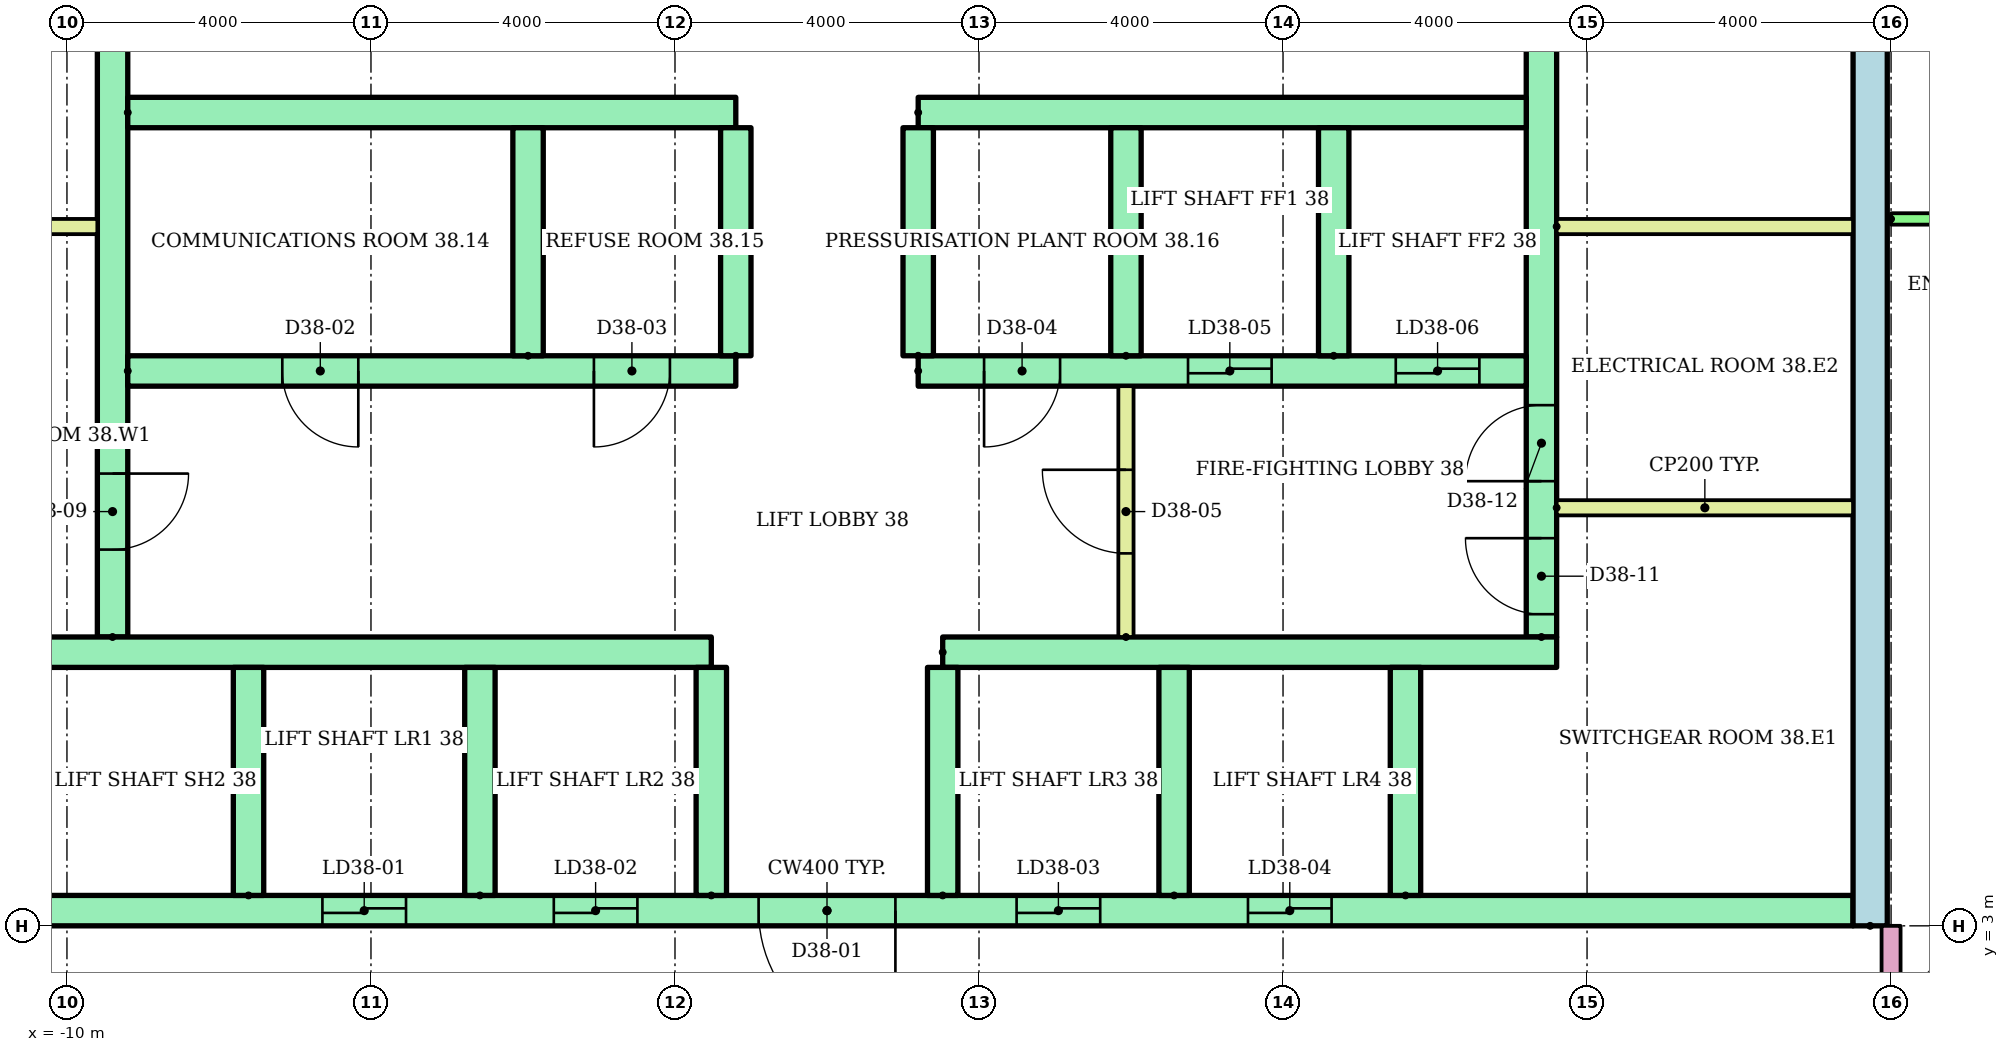
"""IFC4 building model, lengths in metres.
Left out: names, types, materials, properties, quantities, classifications, styles, units other than length and angle.
Written with IfcOpenShell. Run it as: python <this file> out.ifc"""

import sys

from ifc_helpers import new_model, si_unit, direction, frame, frame_2d, origin, place, context, subcontext, project, spatial, rectangle, extrude, element, fill, save


model = new_model("IFC4")
c1 = context("Model", 3, precision=1e-05, world=origin(), true_north=direction((0.0, 1.0)))
c2 = subcontext(c1, "Body", "Model", "MODEL_VIEW")
j1 = project(units=[si_unit("LENGTHUNIT", "METRE"), si_unit("PLANEANGLEUNIT", "RADIAN")], contexts=[c1])
p1 = place(None, origin())
s1 = spatial("IfcSite", under=j1, at=p1, CompositionType="ELEMENT")
p2 = place(p1, origin())
s2 = spatial("IfcBuilding", under=s1, at=p2, CompositionType="ELEMENT")
p3 = place(p2, frame((0.0, 0.0, 145.4)))
s3 = spatial("IfcBuildingStorey", under=s2, at=p3, CompositionType="ELEMENT", Elevation=145.4)
p4 = place(p3, frame((13.725, 3.0, 0.0), z_axis=(0.0, 0.0, 1.0), x_axis=(0.0, 1.0, 0.0)))
e1 = element("IfcWall", 1, at=p4, inside=s3, PredefinedType="SHEAR", context=c2, shape_type="SweptSolid", body=[
    extrude(rectangle(XDim=17.0, YDim=0.45, at=frame_2d((8.5, 0.0))), origin(), (0.0, 0.0, 1.0), 2.92),
])
p5 = place(p3, frame((-9.4, 6.8, 0.0), z_axis=(0.0, 0.0, 1.0), x_axis=(0.0, 1.0, 0.0)))
e2 = element("IfcWall", 2, at=p5, inside=s3, PredefinedType="SHEAR", context=c2, shape_type="SweptSolid", body=[
    extrude(rectangle(XDim=12.7, YDim=0.4, at=frame_2d((6.35, 0.0))), origin(), (0.0, 0.0, 1.0), 2.92),
])
p6 = place(p5, frame((1.15, 0.0, 0.0)))
e3 = element("IfcOpeningElement", 3, at=p6, cuts=e2, PredefinedType="OPENING", context=c2, shape_type="SweptSolid", body=[
    extrude(rectangle(XDim=1.0, YDim=2.1, at=frame_2d((0.5, 1.05))), frame((0.0, 0.21, 0.0), z_axis=(0.0, -1.0, 0.0), x_axis=(1.0, 0.0, 0.0)), (0.0, 0.0, 1.0), 0.42),
])
p7 = place(p5, frame((7.925, 0.0, 0.0)))
e4 = element("IfcOpeningElement", 4, at=p7, cuts=e2, PredefinedType="OPENING", context=c2, shape_type="SweptSolid", body=[
    extrude(rectangle(XDim=1.0, YDim=2.1, at=frame_2d((0.5, 1.05))), frame((0.0, 0.21, 0.0), z_axis=(0.0, -1.0, 0.0), x_axis=(1.0, 0.0, 0.0)), (0.0, 0.0, 1.0), 0.42),
])
p8 = place(p3, frame((9.4, 6.8, 0.0), z_axis=(0.0, 0.0, 1.0), x_axis=(0.0, 1.0, 0.0)))
e5 = element("IfcWall", 5, at=p8, inside=s3, PredefinedType="SHEAR", context=c2, shape_type="SweptSolid", body=[
    extrude(rectangle(XDim=12.7, YDim=0.4, at=frame_2d((6.35, 0.0))), origin(), (0.0, 0.0, 1.0), 2.92),
])
p9 = place(p8, frame((0.3, 0.0, 0.0)))
e6 = element("IfcOpeningElement", 6, at=p9, cuts=e5, PredefinedType="OPENING", context=c2, shape_type="SweptSolid", body=[
    extrude(rectangle(XDim=1.0, YDim=2.1, at=frame_2d((0.5, 1.05))), frame((0.0, 0.21, 0.0), z_axis=(0.0, -1.0, 0.0), x_axis=(1.0, 0.0, 0.0)), (0.0, 0.0, 1.0), 0.42),
])
p10 = place(p8, frame((2.05, 0.0, 0.0)))
e7 = element("IfcOpeningElement", 7, at=p10, cuts=e5, PredefinedType="OPENING", context=c2, shape_type="SweptSolid", body=[
    extrude(rectangle(XDim=1.0, YDim=2.1, at=frame_2d((0.5, 1.05))), frame((0.0, 0.21, 0.0), z_axis=(0.0, -1.0, 0.0), x_axis=(1.0, 0.0, 0.0)), (0.0, 0.0, 1.0), 0.42),
])
p11 = place(p8, frame((7.925, 0.0, 0.0)))
e8 = element("IfcOpeningElement", 8, at=p11, cuts=e5, PredefinedType="OPENING", context=c2, shape_type="SweptSolid", body=[
    extrude(rectangle(XDim=1.0, YDim=2.1, at=frame_2d((0.5, 1.05))), frame((0.0, 0.21, 0.0), z_axis=(0.0, -1.0, 0.0), x_axis=(1.0, 0.0, 0.0)), (0.0, 0.0, 1.0), 0.42),
])
p12 = place(p3, frame((-13.5, 3.2, 0.0)))
e9 = element("IfcWall", 9, at=p12, inside=s3, PredefinedType="SHEAR", context=c2, shape_type="SweptSolid", body=[
    extrude(rectangle(XDim=27.0, YDim=0.4, at=frame_2d((13.5, 0.0))), origin(), (0.0, 0.0, 1.0), 2.92),
])
p13 = place(p12, frame((6.861, 0.0, 0.0)))
e10 = element("IfcOpeningElement", 10, at=p13, cuts=e9, PredefinedType="OPENING", context=c2, shape_type="SweptSolid", body=[
    extrude(rectangle(XDim=1.1, YDim=2.1, at=frame_2d((0.55, 1.05))), frame((0.0, 0.21, 0.0), z_axis=(0.0, -1.0, 0.0), x_axis=(1.0, 0.0, 0.0)), (0.0, 0.0, 1.0), 0.42),
])
p14 = place(p12, frame((9.906, 0.0, 0.0)))
e11 = element("IfcOpeningElement", 11, at=p14, cuts=e9, PredefinedType="OPENING", context=c2, shape_type="SweptSolid", body=[
    extrude(rectangle(XDim=1.1, YDim=2.1, at=frame_2d((0.55, 1.05))), frame((0.0, 0.21, 0.0), z_axis=(0.0, -1.0, 0.0), x_axis=(1.0, 0.0, 0.0)), (0.0, 0.0, 1.0), 0.42),
])
p15 = place(p12, frame((15.994, 0.0, 0.0)))
e12 = element("IfcOpeningElement", 12, at=p15, cuts=e9, PredefinedType="OPENING", context=c2, shape_type="SweptSolid", body=[
    extrude(rectangle(XDim=1.1, YDim=2.1, at=frame_2d((0.55, 1.05))), frame((0.0, 0.21, 0.0), z_axis=(0.0, -1.0, 0.0), x_axis=(1.0, 0.0, 0.0)), (0.0, 0.0, 1.0), 0.42),
])
p16 = place(p12, frame((19.039, 0.0, 0.0)))
e13 = element("IfcOpeningElement", 13, at=p16, cuts=e9, PredefinedType="OPENING", context=c2, shape_type="SweptSolid", body=[
    extrude(rectangle(XDim=1.1, YDim=2.1, at=frame_2d((0.55, 1.05))), frame((0.0, 0.21, 0.0), z_axis=(0.0, -1.0, 0.0), x_axis=(1.0, 0.0, 0.0)), (0.0, 0.0, 1.0), 0.42),
])
p17 = place(p12, frame((12.6, 0.0, 0.0)))
e14 = element("IfcOpeningElement", 14, at=p17, cuts=e9, PredefinedType="OPENING", context=c2, shape_type="SweptSolid", body=[
    extrude(rectangle(XDim=1.8, YDim=2.1, at=frame_2d((0.9, 1.05))), frame((0.0, 0.21, 0.0), z_axis=(0.0, -1.0, 0.0), x_axis=(1.0, 0.0, 0.0)), (0.0, 0.0, 1.0), 0.42),
])
p18 = place(p3, frame((-13.5, 6.6, 0.0)))
e15 = element("IfcWall", 15, at=p18, inside=s3, PredefinedType="SHEAR", context=c2, shape_type="SweptSolid", body=[
    extrude(rectangle(XDim=11.978, YDim=0.4, at=frame_2d((5.989, 0.0))), origin(), (0.0, 0.0, 1.0), 2.92),
])
p19 = place(p3, frame((1.522, 6.6, 0.0)))
e16 = element("IfcWall", 16, at=p19, inside=s3, PredefinedType="SHEAR", context=c2, shape_type="SweptSolid", body=[
    extrude(rectangle(XDim=8.078, YDim=0.4, at=frame_2d((4.039, 0.0))), origin(), (0.0, 0.0, 1.0), 2.92),
])
for number, where, z_axis, x_axis in (
    (17, (-7.611, 3.4, 0.0), (0.0, 0.0, 1.0), (0.0, 1.0, 0.0)),
    (18, (-4.567, 3.4, 0.0), (0.0, 0.0, 1.0), (0.0, 1.0, 0.0)),
    (19, (-1.522, 3.4, 0.0), (0.0, 0.0, 1.0), (0.0, 1.0, 0.0)),
    (20, (1.522, 3.4, 0.0), (0.0, 0.0, 1.0), (0.0, 1.0, 0.0)),
    (21, (4.567, 3.4, 0.0), (0.0, 0.0, 1.0), (0.0, 1.0, 0.0)),
    (22, (7.611, 3.4, 0.0), (0.0, 0.0, 1.0), (0.0, 1.0, 0.0)),
):
    element("IfcWall", number, at=place(p3, frame(where, z_axis=z_axis, x_axis=x_axis)), inside=s3, PredefinedType="SHEAR", context=c2, shape_type="SweptSolid", body=[
        extrude(rectangle(XDim=3.0, YDim=0.4, at=frame_2d((1.5, 0.0))), origin(), (0.0, 0.0, 1.0), 2.92),
    ])
p20 = place(p3, frame((-9.2, 10.3, 0.0)))
e23 = element("IfcWall", 23, at=p20, inside=s3, PredefinedType="SHEAR", context=c2, shape_type="SweptSolid", body=[
    extrude(rectangle(XDim=8.0, YDim=0.4, at=frame_2d((4.0, 0.0))), origin(), (0.0, 0.0, 1.0), 2.92),
])
p21 = place(p20, frame((2.033, 0.0, 0.0)))
e24 = element("IfcOpeningElement", 24, at=p21, cuts=e23, PredefinedType="OPENING", context=c2, shape_type="SweptSolid", body=[
    extrude(rectangle(XDim=1.0, YDim=2.1, at=frame_2d((0.5, 1.05))), frame((0.0, 0.21, 0.0), z_axis=(0.0, -1.0, 0.0), x_axis=(1.0, 0.0, 0.0)), (0.0, 0.0, 1.0), 0.42),
])
p22 = place(p20, frame((6.133, 0.0, 0.0)))
e25 = element("IfcOpeningElement", 25, at=p22, cuts=e23, PredefinedType="OPENING", context=c2, shape_type="SweptSolid", body=[
    extrude(rectangle(XDim=1.0, YDim=2.1, at=frame_2d((0.5, 1.05))), frame((0.0, 0.21, 0.0), z_axis=(0.0, -1.0, 0.0), x_axis=(1.0, 0.0, 0.0)), (0.0, 0.0, 1.0), 0.42),
])
p23 = place(p3, frame((-9.2, 13.7, 0.0)))
e26 = element("IfcWall", 26, at=p23, inside=s3, PredefinedType="SHEAR", context=c2, shape_type="SweptSolid", body=[
    extrude(rectangle(XDim=8.0, YDim=0.4, at=frame_2d((4.0, 0.0))), origin(), (0.0, 0.0, 1.0), 2.92),
])
p24 = place(p3, frame((1.2, 10.3, 0.0)))
e27 = element("IfcWall", 27, at=p24, inside=s3, PredefinedType="SHEAR", context=c2, shape_type="SweptSolid", body=[
    extrude(rectangle(XDim=8.0, YDim=0.4, at=frame_2d((4.0, 0.0))), origin(), (0.0, 0.0, 1.0), 2.92),
])
p25 = place(p24, frame((3.55, 0.0, 0.0)))
e28 = element("IfcOpeningElement", 28, at=p25, cuts=e27, PredefinedType="OPENING", context=c2, shape_type="SweptSolid", body=[
    extrude(rectangle(XDim=1.1, YDim=2.1, at=frame_2d((0.55, 1.05))), frame((0.0, 0.21, 0.0), z_axis=(0.0, -1.0, 0.0), x_axis=(1.0, 0.0, 0.0)), (0.0, 0.0, 1.0), 0.42),
])
p26 = place(p24, frame((6.283, 0.0, 0.0)))
e29 = element("IfcOpeningElement", 29, at=p26, cuts=e27, PredefinedType="OPENING", context=c2, shape_type="SweptSolid", body=[
    extrude(rectangle(XDim=1.1, YDim=2.1, at=frame_2d((0.55, 1.05))), frame((0.0, 0.21, 0.0), z_axis=(0.0, -1.0, 0.0), x_axis=(1.0, 0.0, 0.0)), (0.0, 0.0, 1.0), 0.42),
])
p27 = place(p24, frame((0.867, 0.0, 0.0)))
e30 = element("IfcOpeningElement", 30, at=p27, cuts=e27, PredefinedType="OPENING", context=c2, shape_type="SweptSolid", body=[
    extrude(rectangle(XDim=1.0, YDim=2.1, at=frame_2d((0.5, 1.05))), frame((0.0, 0.21, 0.0), z_axis=(0.0, -1.0, 0.0), x_axis=(1.0, 0.0, 0.0)), (0.0, 0.0, 1.0), 0.42),
])
p28 = place(p3, frame((1.2, 13.7, 0.0)))
e31 = element("IfcWall", 31, at=p28, inside=s3, PredefinedType="SHEAR", context=c2, shape_type="SweptSolid", body=[
    extrude(rectangle(XDim=8.0, YDim=0.4, at=frame_2d((4.0, 0.0))), origin(), (0.0, 0.0, 1.0), 2.92),
])
for number, where, z_axis, x_axis in (
    (32, (-3.933, 10.5, 0.0), (0.0, 0.0, 1.0), (0.0, 1.0, 0.0)),
    (33, (-1.2, 10.5, 0.0), (0.0, 0.0, 1.0), (0.0, 1.0, 0.0)),
    (34, (1.2, 10.5, 0.0), (0.0, 0.0, 1.0), (0.0, 1.0, 0.0)),
    (35, (3.933, 10.5, 0.0), (0.0, 0.0, 1.0), (0.0, 1.0, 0.0)),
    (36, (6.667, 10.5, 0.0), (0.0, 0.0, 1.0), (0.0, 1.0, 0.0)),
):
    element("IfcWall", number, at=place(p3, frame(where, z_axis=z_axis, x_axis=x_axis)), inside=s3, PredefinedType="SHEAR", context=c2, shape_type="SweptSolid", body=[
        extrude(rectangle(XDim=3.0, YDim=0.4, at=frame_2d((1.5, 0.0))), origin(), (0.0, 0.0, 1.0), 2.92),
    ])
p29 = place(p3, frame((3.933, 6.8, 0.0), z_axis=(0.0, 0.0, 1.0), x_axis=(0.0, 1.0, 0.0)))
e37 = element("IfcWall", 37, at=p29, inside=s3, PredefinedType="PARTITIONING", context=c2, shape_type="SweptSolid", body=[
    extrude(rectangle(XDim=3.3, YDim=0.2, at=frame_2d((1.65, 0.0))), origin(), (0.0, 0.0, 1.0), 2.92),
])
p30 = place(p29, frame((1.1, 0.0, 0.0)))
e38 = element("IfcOpeningElement", 38, at=p30, cuts=e37, PredefinedType="OPENING", context=c2, shape_type="SweptSolid", body=[
    extrude(rectangle(XDim=1.1, YDim=2.1, at=frame_2d((0.55, 1.05))), frame((0.0, 0.11, 0.0), z_axis=(0.0, -1.0, 0.0), x_axis=(1.0, 0.0, 0.0)), (0.0, 0.0, 1.0), 0.22),
])
for number, where in (
    (39, (-13.5, 12.2, 0.0)),
    (40, (9.6, 8.5, 0.0)),
    (41, (9.6, 12.2, 0.0)),
):
    element("IfcWall", number, at=place(p3, frame(where)), inside=s3, PredefinedType="PARTITIONING", context=c2, shape_type="SweptSolid", body=[
        extrude(rectangle(XDim=3.9, YDim=0.2, at=frame_2d((1.95, 0.0))), origin(), (0.0, 0.0, 1.0), 2.92),
    ])
p31 = place(p3, frame((14.0, 12.3, 0.0)))
e42 = element("IfcWall", 42, at=p31, inside=s3, PredefinedType="PARTITIONING", context=c2, shape_type="SweptSolid", body=[
    extrude(rectangle(XDim=18.72, YDim=0.15, at=frame_2d((9.36, 0.0))), origin(), (0.0, 0.0, 1.0), 2.4),
])
p32 = place(p31, frame((5.5, 0.0, 0.0)))
e43 = element("IfcOpeningElement", 43, at=p32, cuts=e42, PredefinedType="OPENING", context=c2, shape_type="SweptSolid", body=[
    extrude(rectangle(XDim=1.0, YDim=2.1, at=frame_2d((0.5, 1.05))), frame((0.0, 0.085, 0.0), z_axis=(0.0, -1.0, 0.0), x_axis=(1.0, 0.0, 0.0)), (0.0, 0.0, 1.0), 0.17),
])
p33 = place(p31, frame((14.8, 0.0, 0.0)))
e44 = element("IfcOpeningElement", 44, at=p33, cuts=e42, PredefinedType="OPENING", context=c2, shape_type="SweptSolid", body=[
    extrude(rectangle(XDim=0.9, YDim=2.1, at=frame_2d((0.45, 1.05))), frame((0.0, 0.085, 0.0), z_axis=(0.0, -1.0, 0.0), x_axis=(1.0, 0.0, 0.0)), (0.0, 0.0, 1.0), 0.17),
])
p34 = place(p3, frame((14.0, 1.4, 0.0), z_axis=(0.0, 0.0, 1.0), x_axis=(0.0, 1.0, 0.0)))
e45 = element("IfcWall", 45, at=p34, inside=s3, PredefinedType="PARTITIONING", context=c2, shape_type="SweptSolid", body=[
    extrude(rectangle(XDim=1.6, YDim=0.25, at=frame_2d((0.8, 0.0))), origin(), (0.0, 0.0, 1.0), 2.4),
])
p35 = place(p13, origin())
e46 = element("IfcDoor", 46, at=p35, inside=s3, OperationType="SLIDING_TO_LEFT", PredefinedType="DOOR", context=c2, shape_type="SweptSolid", body=[
    extrude(rectangle(XDim=1.1, YDim=2.1, at=frame_2d((0.55, 1.05))), frame((0.0, 0.025, 0.0), z_axis=(0.0, -1.0, 0.0), x_axis=(1.0, 0.0, 0.0)), (0.0, 0.0, 1.0), 0.05),
])
fill(e10, e46)
p36 = place(p14, origin())
e47 = element("IfcDoor", 47, at=p36, inside=s3, OperationType="SLIDING_TO_LEFT", PredefinedType="DOOR", context=c2, shape_type="SweptSolid", body=[
    extrude(rectangle(XDim=1.1, YDim=2.1, at=frame_2d((0.55, 1.05))), frame((0.0, 0.025, 0.0), z_axis=(0.0, -1.0, 0.0), x_axis=(1.0, 0.0, 0.0)), (0.0, 0.0, 1.0), 0.05),
])
fill(e11, e47)
p37 = place(p15, origin())
e48 = element("IfcDoor", 48, at=p37, inside=s3, OperationType="SLIDING_TO_LEFT", PredefinedType="DOOR", context=c2, shape_type="SweptSolid", body=[
    extrude(rectangle(XDim=1.1, YDim=2.1, at=frame_2d((0.55, 1.05))), frame((0.0, 0.025, 0.0), z_axis=(0.0, -1.0, 0.0), x_axis=(1.0, 0.0, 0.0)), (0.0, 0.0, 1.0), 0.05),
])
fill(e12, e48)
p38 = place(p16, origin())
e49 = element("IfcDoor", 49, at=p38, inside=s3, OperationType="SLIDING_TO_LEFT", PredefinedType="DOOR", context=c2, shape_type="SweptSolid", body=[
    extrude(rectangle(XDim=1.1, YDim=2.1, at=frame_2d((0.55, 1.05))), frame((0.0, 0.025, 0.0), z_axis=(0.0, -1.0, 0.0), x_axis=(1.0, 0.0, 0.0)), (0.0, 0.0, 1.0), 0.05),
])
fill(e13, e49)
p39 = place(p17, frame((1.8, 0.0, 0.0), z_axis=(0.0, 0.0, 1.0), x_axis=(-1.0, 0.0, 0.0)))
e50 = element("IfcDoor", 50, at=p39, inside=s3, OperationType="DOUBLE_DOOR_SINGLE_SWING", PredefinedType="DOOR", context=c2, shape_type="SweptSolid", body=[
    extrude(rectangle(XDim=1.8, YDim=2.1, at=frame_2d((0.9, 1.05))), frame((0.0, 0.025, 0.0), z_axis=(0.0, -1.0, 0.0), x_axis=(1.0, 0.0, 0.0)), (0.0, 0.0, 1.0), 0.05),
])
fill(e14, e50)
p40 = place(p25, origin())
e51 = element("IfcDoor", 51, at=p40, inside=s3, OperationType="SLIDING_TO_LEFT", PredefinedType="DOOR", context=c2, shape_type="SweptSolid", body=[
    extrude(rectangle(XDim=1.1, YDim=2.1, at=frame_2d((0.55, 1.05))), frame((0.0, 0.025, 0.0), z_axis=(0.0, -1.0, 0.0), x_axis=(1.0, 0.0, 0.0)), (0.0, 0.0, 1.0), 0.05),
])
fill(e28, e51)
p41 = place(p26, origin())
e52 = element("IfcDoor", 52, at=p41, inside=s3, OperationType="SLIDING_TO_LEFT", PredefinedType="DOOR", context=c2, shape_type="SweptSolid", body=[
    extrude(rectangle(XDim=1.1, YDim=2.1, at=frame_2d((0.55, 1.05))), frame((0.0, 0.025, 0.0), z_axis=(0.0, -1.0, 0.0), x_axis=(1.0, 0.0, 0.0)), (0.0, 0.0, 1.0), 0.05),
])
fill(e29, e52)
p42 = place(p21, frame((1.0, 0.0, 0.0), z_axis=(0.0, 0.0, 1.0), x_axis=(-1.0, 0.0, 0.0)))
e53 = element("IfcDoor", 53, at=p42, inside=s3, OperationType="SINGLE_SWING_RIGHT", PredefinedType="DOOR", context=c2, shape_type="SweptSolid", body=[
    extrude(rectangle(XDim=1.0, YDim=2.1, at=frame_2d((0.5, 1.05))), frame((0.0, 0.025, 0.0), z_axis=(0.0, -1.0, 0.0), x_axis=(1.0, 0.0, 0.0)), (0.0, 0.0, 1.0), 0.05),
])
fill(e24, e53)
p43 = place(p22, frame((1.0, 0.0, 0.0), z_axis=(0.0, 0.0, 1.0), x_axis=(-1.0, 0.0, 0.0)))
e54 = element("IfcDoor", 54, at=p43, inside=s3, OperationType="SINGLE_SWING_LEFT", PredefinedType="DOOR", context=c2, shape_type="SweptSolid", body=[
    extrude(rectangle(XDim=1.0, YDim=2.1, at=frame_2d((0.5, 1.05))), frame((0.0, 0.025, 0.0), z_axis=(0.0, -1.0, 0.0), x_axis=(1.0, 0.0, 0.0)), (0.0, 0.0, 1.0), 0.05),
])
fill(e25, e54)
p44 = place(p27, frame((1.0, 0.0, 0.0), z_axis=(0.0, 0.0, 1.0), x_axis=(-1.0, 0.0, 0.0)))
e55 = element("IfcDoor", 55, at=p44, inside=s3, OperationType="SINGLE_SWING_LEFT", PredefinedType="DOOR", context=c2, shape_type="SweptSolid", body=[
    extrude(rectangle(XDim=1.0, YDim=2.1, at=frame_2d((0.5, 1.05))), frame((0.0, 0.025, 0.0), z_axis=(0.0, -1.0, 0.0), x_axis=(1.0, 0.0, 0.0)), (0.0, 0.0, 1.0), 0.05),
])
fill(e30, e55)
p45 = place(p30, origin())
e56 = element("IfcDoor", 56, at=p45, inside=s3, OperationType="SINGLE_SWING_RIGHT", PredefinedType="DOOR", context=c2, shape_type="SweptSolid", body=[
    extrude(rectangle(XDim=1.1, YDim=2.1, at=frame_2d((0.55, 1.05))), frame((0.0, 0.025, 0.0), z_axis=(0.0, -1.0, 0.0), x_axis=(1.0, 0.0, 0.0)), (0.0, 0.0, 1.0), 0.05),
])
fill(e38, e56)
p46 = place(p6, frame((1.0, 0.0, 0.0), z_axis=(0.0, 0.0, 1.0), x_axis=(-1.0, 0.0, 0.0)))
e57 = element("IfcDoor", 57, at=p46, inside=s3, OperationType="SINGLE_SWING_RIGHT", PredefinedType="DOOR", context=c2, shape_type="SweptSolid", body=[
    extrude(rectangle(XDim=1.0, YDim=2.1, at=frame_2d((0.5, 1.05))), frame((0.0, 0.025, 0.0), z_axis=(0.0, -1.0, 0.0), x_axis=(1.0, 0.0, 0.0)), (0.0, 0.0, 1.0), 0.05),
])
fill(e3, e57)
p47 = place(p9, origin())
e58 = element("IfcDoor", 58, at=p47, inside=s3, OperationType="SINGLE_SWING_RIGHT", PredefinedType="DOOR", context=c2, shape_type="SweptSolid", body=[
    extrude(rectangle(XDim=1.0, YDim=2.1, at=frame_2d((0.5, 1.05))), frame((0.0, 0.025, 0.0), z_axis=(0.0, -1.0, 0.0), x_axis=(1.0, 0.0, 0.0)), (0.0, 0.0, 1.0), 0.05),
])
fill(e6, e58)
p48 = place(p10, origin())
e59 = element("IfcDoor", 59, at=p48, inside=s3, OperationType="SINGLE_SWING_LEFT", PredefinedType="DOOR", context=c2, shape_type="SweptSolid", body=[
    extrude(rectangle(XDim=1.0, YDim=2.1, at=frame_2d((0.5, 1.05))), frame((0.0, 0.025, 0.0), z_axis=(0.0, -1.0, 0.0), x_axis=(1.0, 0.0, 0.0)), (0.0, 0.0, 1.0), 0.05),
])
fill(e7, e59)
save(model, sys.argv[1])
